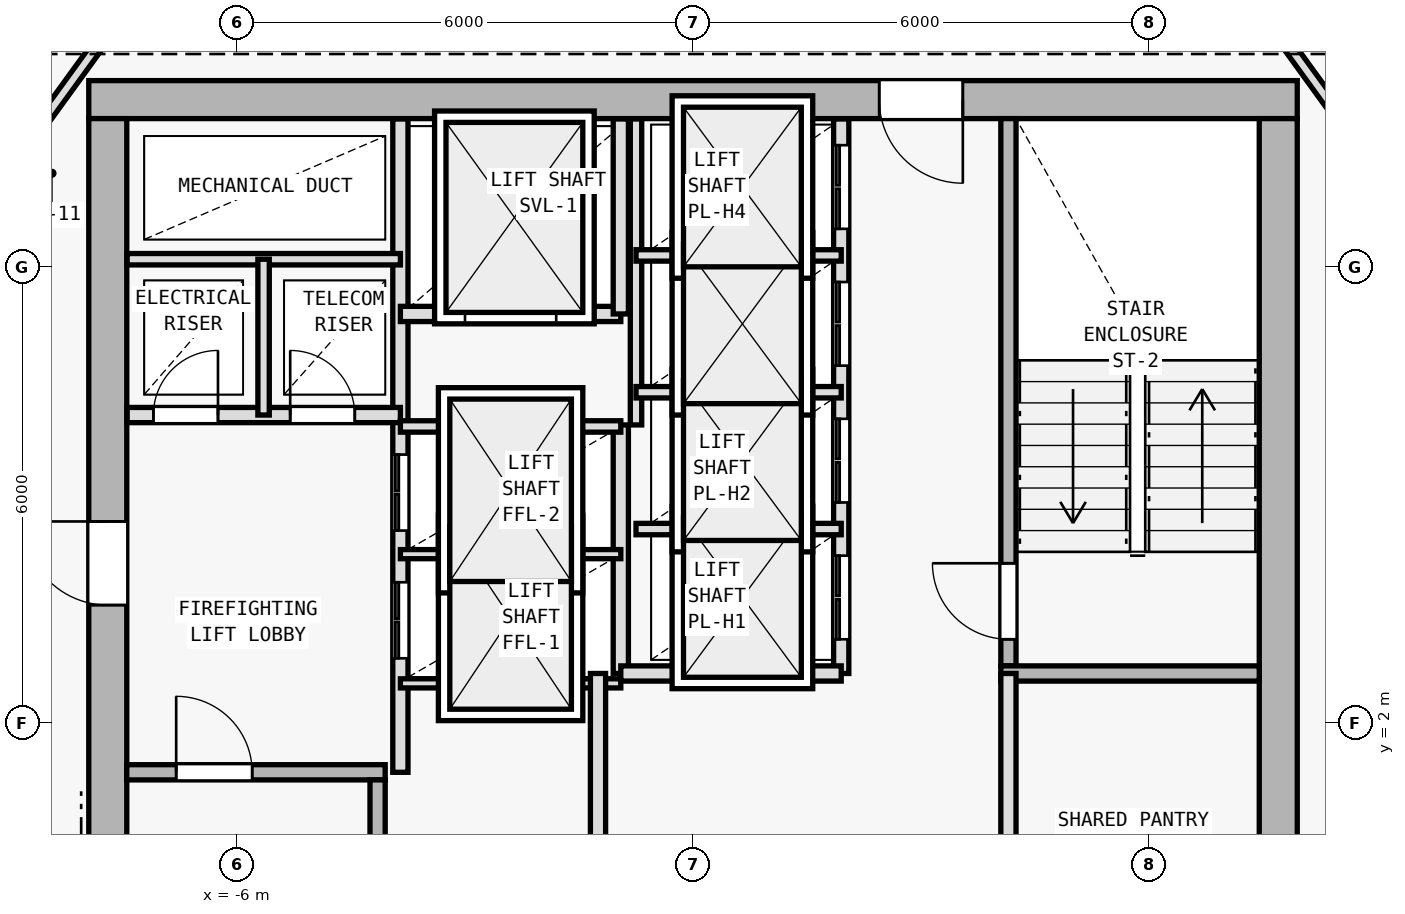
"""IFC4 building model, lengths in metres.
Left out: names, types, materials, properties, quantities, classifications, styles, units other than length and angle.
Written with IfcOpenShell. Run it as: python <this file> out.ifc"""

import sys

from ifc_helpers import new_model, si_unit, direction, frame, frame_2d, origin, origin_2d, place, context, subcontext, project, spatial, rectangle, i_section, extrude, element, fill, save


model = new_model("IFC4")
c1 = context("Model", 3, precision=1e-05, world=origin(), true_north=direction((0.0, 1.0)))
c2 = subcontext(c1, "Body", "Model", "MODEL_VIEW")
j1 = project(units=[si_unit("LENGTHUNIT", "METRE"), si_unit("PLANEANGLEUNIT", "RADIAN")], contexts=[c1])
p1 = place(None, origin())
s1 = spatial("IfcSite", under=j1, at=p1, CompositionType="ELEMENT")
p2 = place(p1, origin())
s2 = spatial("IfcBuilding", under=s1, at=p2, CompositionType="ELEMENT")
p3 = place(p2, frame((0.0, 0.0, 279.6)))
s3 = spatial("IfcBuildingStorey", under=s2, at=p3, CompositionType="ELEMENT", Elevation=279.6)
for number, where, z_axis, x_axis in (
    (1, (7.7, 10.2, 0.0), (0.0, 0.0, 1.0), (1.0, 0.0, 0.0)),
    (2, (-7.7, 10.2, 0.0), (0.0, 0.0, 1.0), (1.0, 0.0, 0.0)),
    (3, (7.7, 0.4, 0.0), (0.0, 0.0, 1.0), (1.0, 0.0, 0.0)),
    (4, (-7.7, 2.0, 0.0), (0.0, 0.0, 1.0), (1.0, 0.0, 0.0)),
):
    element("IfcColumn", number, at=place(p3, frame(where, z_axis=z_axis, x_axis=x_axis)), inside=s3, PredefinedType="COLUMN", context=c2, shape_type="SweptSolid", body=[
        extrude(i_section(OverallWidth=0.374, OverallDepth=0.372, WebThickness=0.012, FlangeThickness=0.02, FilletRadius=0.015, at=origin_2d()), origin(), (0.0, 0.0, 1.0), 3.6),
    ])
p4 = place(p3, frame((7.95, 10.2, 0.0), z_axis=(0.0, 0.0, 1.0), x_axis=(-1.0, 0.0, 0.0)))
e5 = element("IfcWall", 5, at=p4, inside=s3, PredefinedType="SHEAR", context=c2, shape_type="SweptSolid", body=[
    extrude(rectangle(XDim=15.9, YDim=0.5, at=frame_2d((7.95, 0.0))), origin(), (0.0, 0.0, 1.0), 3.35),
])
p5 = place(p4, frame((4.4, 0.0, 0.0)))
e6 = element("IfcOpeningElement", 6, at=p5, cuts=e5, PredefinedType="OPENING", context=c2, shape_type="SweptSolid", body=[
    extrude(rectangle(XDim=1.1, YDim=2.15, at=frame_2d((0.55, 1.075))), frame((0.0, 0.26, 0.0), z_axis=(0.0, -1.0, 0.0), x_axis=(1.0, 0.0, 0.0)), (0.0, 0.0, 1.0), 0.52),
])
p6 = place(p3, frame((-7.7, -9.15, 0.0), z_axis=(0.0, 0.0, 1.0), x_axis=(0.0, 1.0, 0.0)))
e7 = element("IfcWall", 7, at=p6, inside=s3, PredefinedType="SHEAR", context=c2, shape_type="SweptSolid", body=[
    extrude(rectangle(XDim=19.1, YDim=0.5, at=frame_2d((9.55, 0.0))), origin(), (0.0, 0.0, 1.0), 3.35),
])
p7 = place(p6, frame((12.7, 0.0, 0.0)))
e8 = element("IfcOpeningElement", 8, at=p7, cuts=e7, PredefinedType="OPENING", context=c2, shape_type="SweptSolid", body=[
    extrude(rectangle(XDim=1.1, YDim=2.15, at=frame_2d((0.55, 1.075))), frame((0.0, 0.26, 0.0), z_axis=(0.0, -1.0, 0.0), x_axis=(1.0, 0.0, 0.0)), (0.0, 0.0, 1.0), 0.52),
])
p8 = place(p3, frame((7.7, 9.95, 0.0), z_axis=(0.0, 0.0, 1.0), x_axis=(0.0, -1.0, 0.0)))
e9 = element("IfcWall", 9, at=p8, inside=s3, PredefinedType="SHEAR", context=c2, shape_type="SweptSolid", body=[
    extrude(rectangle(XDim=19.1, YDim=0.5, at=frame_2d((9.55, 0.0))), origin(), (0.0, 0.0, 1.0), 3.35),
])
p9 = place(p3, frame((-7.45, 1.35, 0.0), z_axis=(0.0, 0.0, 1.0), x_axis=(1.0, 0.0, 0.0)))
e10 = element("IfcWall", 10, at=p9, inside=s3, PredefinedType="SOLIDWALL", context=c2, shape_type="SweptSolid", body=[
    extrude(rectangle(XDim=3.4, YDim=0.2, at=frame_2d((1.7, 0.0))), origin(), (0.0, 0.0, 1.0), 3.35),
])
p10 = place(p9, frame((0.65, 0.0, 0.0)))
e11 = element("IfcOpeningElement", 11, at=p10, cuts=e10, PredefinedType="OPENING", context=c2, shape_type="SweptSolid", body=[
    extrude(rectangle(XDim=1.0, YDim=2.15, at=frame_2d((0.5, 1.075))), frame((0.0, 0.11, 0.0), z_axis=(0.0, -1.0, 0.0), x_axis=(1.0, 0.0, 0.0)), (0.0, 0.0, 1.0), 0.22),
])
p11 = place(p3, frame((-4.15, -5.95, 0.0), z_axis=(0.0, 0.0, 1.0), x_axis=(0.0, 1.0, 0.0)))
e12 = element("IfcWall", 12, at=p11, inside=s3, PredefinedType="SOLIDWALL", context=c2, shape_type="SweptSolid", body=[
    extrude(rectangle(XDim=7.2, YDim=0.2, at=frame_2d((3.6, 0.0))), origin(), (0.0, 0.0, 1.0), 3.35),
])
p12 = place(p3, frame((-3.85, 1.35, 0.0), z_axis=(0.0, 0.0, 1.0), x_axis=(0.0, 1.0, 0.0)))
e13 = element("IfcWall", 13, at=p12, inside=s3, PredefinedType="SOLIDWALL", context=c2, shape_type="SweptSolid", body=[
    extrude(rectangle(XDim=8.595, YDim=0.2, at=frame_2d((4.297, 0.0))), origin(), (0.0, 0.0, 1.0), 3.35),
])
p13 = place(p12, frame((1.5, 0.0, 0.0)))
e14 = element("IfcOpeningElement", 14, at=p13, cuts=e13, PredefinedType="OPENING", context=c2, shape_type="SweptSolid", body=[
    extrude(rectangle(XDim=1.0, YDim=2.15, at=frame_2d((0.5, 1.075))), frame((0.0, 0.11, 0.0), z_axis=(0.0, -1.0, 0.0), x_axis=(1.0, 0.0, 0.0)), (0.0, 0.0, 1.0), 0.22),
])
p14 = place(p12, frame((3.18, 0.0, 0.0)))
e15 = element("IfcOpeningElement", 15, at=p14, cuts=e13, PredefinedType="OPENING", context=c2, shape_type="SweptSolid", body=[
    extrude(rectangle(XDim=1.0, YDim=2.15, at=frame_2d((0.5, 1.075))), frame((0.0, 0.11, 0.0), z_axis=(0.0, -1.0, 0.0), x_axis=(1.0, 0.0, 0.0)), (0.0, 0.0, 1.0), 0.22),
])
p15 = place(p3, frame((-7.445, 6.05, 0.0), z_axis=(0.0, 0.0, 1.0), x_axis=(1.0, 0.0, 0.0)))
e16 = element("IfcWall", 16, at=p15, inside=s3, PredefinedType="SOLIDWALL", context=c2, shape_type="SweptSolid", body=[
    extrude(rectangle(XDim=3.595, YDim=0.2, at=frame_2d((1.797, 0.0))), origin(), (0.0, 0.0, 1.0), 3.35),
])
p16 = place(p15, frame((0.345, 0.0, 0.0)))
e17 = element("IfcOpeningElement", 17, at=p16, cuts=e16, PredefinedType="OPENING", context=c2, shape_type="SweptSolid", body=[
    extrude(rectangle(XDim=0.85, YDim=2.1, at=frame_2d((0.425, 1.05))), frame((0.0, 0.11, 0.0), z_axis=(0.0, -1.0, 0.0), x_axis=(1.0, 0.0, 0.0)), (0.0, 0.0, 1.0), 0.22),
])
p17 = place(p15, frame((2.145, 0.0, 0.0)))
e18 = element("IfcOpeningElement", 18, at=p17, cuts=e16, PredefinedType="OPENING", context=c2, shape_type="SweptSolid", body=[
    extrude(rectangle(XDim=0.85, YDim=2.1, at=frame_2d((0.425, 1.05))), frame((0.0, 0.11, 0.0), z_axis=(0.0, -1.0, 0.0), x_axis=(1.0, 0.0, 0.0)), (0.0, 0.0, 1.0), 0.22),
])
p18 = place(p3, frame((-7.445, 8.1, 0.0), z_axis=(0.0, 0.0, 1.0), x_axis=(1.0, 0.0, 0.0)))
e19 = element("IfcWall", 19, at=p18, inside=s3, PredefinedType="PARTITIONING", context=c2, shape_type="SweptSolid", body=[
    extrude(rectangle(XDim=3.595, YDim=0.15, at=frame_2d((1.797, 0.0))), origin(), (0.0, 0.0, 1.0), 3.35),
])
p19 = place(p3, frame((-5.65, 6.05, 0.0), z_axis=(0.0, 0.0, 1.0), x_axis=(0.0, 1.0, 0.0)))
e20 = element("IfcWall", 20, at=p19, inside=s3, PredefinedType="PARTITIONING", context=c2, shape_type="SweptSolid", body=[
    extrude(rectangle(XDim=2.05, YDim=0.15, at=frame_2d((1.025, 0.0))), origin(), (0.0, 0.0, 1.0), 3.35),
])
p20 = place(p3, frame((4.15, 2.75, 0.0), z_axis=(0.0, 0.0, 1.0), x_axis=(0.0, 1.0, 0.0)))
e21 = element("IfcWall", 21, at=p20, inside=s3, PredefinedType="SOLIDWALL", context=c2, shape_type="SweptSolid", body=[
    extrude(rectangle(XDim=7.2, YDim=0.2, at=frame_2d((3.6, 0.0))), origin(), (0.0, 0.0, 1.0), 3.35),
])
p21 = place(p20, frame((0.35, 0.0, 0.0)))
e22 = element("IfcOpeningElement", 22, at=p21, cuts=e21, PredefinedType="OPENING", context=c2, shape_type="SweptSolid", body=[
    extrude(rectangle(XDim=1.0, YDim=2.15, at=frame_2d((0.5, 1.075))), frame((0.0, 0.11, 0.0), z_axis=(0.0, -1.0, 0.0), x_axis=(1.0, 0.0, 0.0)), (0.0, 0.0, 1.0), 0.22),
])
p22 = place(p3, frame((4.05, 2.65, 0.0), z_axis=(0.0, 0.0, 1.0), x_axis=(1.0, 0.0, 0.0)))
e23 = element("IfcWall", 23, at=p22, inside=s3, PredefinedType="SOLIDWALL", context=c2, shape_type="SweptSolid", body=[
    extrude(rectangle(XDim=3.4, YDim=0.2, at=frame_2d((1.7, 0.0))), origin(), (0.0, 0.0, 1.0), 3.35),
])
p23 = place(p3, frame((-0.95, 2.65, 0.0), z_axis=(0.0, 0.0, 1.0), x_axis=(0.0, 1.0, 0.0)))
e24 = element("IfcWall", 24, at=p23, inside=s3, PredefinedType="SOLIDWALL", context=c2, shape_type="SweptSolid", body=[
    extrude(rectangle(XDim=3.27, YDim=0.2, at=frame_2d((1.635, 0.0))), origin(), (0.0, 0.0, 1.0), 3.35),
])
for number, where, z_axis, x_axis in (
    (25, (-3.85, 2.52, 0.0), (0.0, 0.0, 1.0), (1.0, 0.0, 0.0)),
    (26, (-3.85, 4.22, 0.0), (0.0, 0.0, 1.0), (1.0, 0.0, 0.0)),
):
    element("IfcWall", number, at=place(p3, frame(where, z_axis=z_axis, x_axis=x_axis)), inside=s3, PredefinedType="PARTITIONING", context=c2, shape_type="SweptSolid", body=[
        extrude(rectangle(XDim=2.9, YDim=0.12, at=frame_2d((1.45, 0.0))), origin(), (0.0, 0.0, 1.0), 3.35),
    ])
p24 = place(p3, frame((-3.85, 5.9, 0.0), z_axis=(0.0, 0.0, 1.0), x_axis=(1.0, 0.0, 0.0)))
e27 = element("IfcWall", 27, at=p24, inside=s3, PredefinedType="PARTITIONING", context=c2, shape_type="SweptSolid", body=[
    extrude(rectangle(XDim=2.9, YDim=0.15, at=frame_2d((1.45, 0.0))), origin(), (0.0, 0.0, 1.0), 3.35),
])
p25 = place(p3, frame((-3.85, 7.38, 0.0), z_axis=(0.0, 0.0, 1.0), x_axis=(1.0, 0.0, 0.0)))
e28 = element("IfcWall", 28, at=p25, inside=s3, PredefinedType="SOLIDWALL", context=c2, shape_type="SweptSolid", body=[
    extrude(rectangle(XDim=2.9, YDim=0.2, at=frame_2d((1.45, 0.0))), origin(), (0.0, 0.0, 1.0), 3.35),
])
p26 = place(p25, frame((0.85, 0.0, 0.0)))
e29 = element("IfcOpeningElement", 29, at=p26, cuts=e28, PredefinedType="OPENING", context=c2, shape_type="SweptSolid", body=[
    extrude(rectangle(XDim=1.2, YDim=2.2, at=frame_2d((0.6, 1.1))), frame((0.0, 0.11, 0.0), z_axis=(0.0, -1.0, 0.0), x_axis=(1.0, 0.0, 0.0)), (0.0, 0.0, 1.0), 0.22),
])
p27 = place(p3, frame((-0.95, 7.38, 0.0), z_axis=(0.0, 0.0, 1.0), x_axis=(0.0, 1.0, 0.0)))
e30 = element("IfcWall", 30, at=p27, inside=s3, PredefinedType="SOLIDWALL", context=c2, shape_type="SweptSolid", body=[
    extrude(rectangle(XDim=2.565, YDim=0.2, at=frame_2d((1.283, 0.0))), origin(), (0.0, 0.0, 1.0), 3.35),
])
p28 = place(p3, frame((4.15, -6.05, 0.0), z_axis=(0.0, 0.0, 1.0), x_axis=(0.0, 1.0, 0.0)))
e31 = element("IfcWall", 31, at=p28, inside=s3, PredefinedType="SOLIDWALL", context=c2, shape_type="SweptSolid", body=[
    extrude(rectangle(XDim=8.7, YDim=0.2, at=frame_2d((4.35, 0.0))), origin(), (0.0, 0.0, 1.0), 3.35),
])
p29 = place(p28, frame((3.6, 0.0, 0.0)))
e32 = element("IfcOpeningElement", 32, at=p29, cuts=e31, PredefinedType="OPENING", context=c2, shape_type="SweptSolid", body=[
    extrude(rectangle(XDim=0.95, YDim=2.1, at=frame_2d((0.475, 1.05))), frame((0.0, 0.11, 0.0), z_axis=(0.0, -1.0, 0.0), x_axis=(1.0, 0.0, 0.0)), (0.0, 0.0, 1.0), 0.22),
])
p30 = place(p3, frame((-1.25, -6.05, 0.0), z_axis=(0.0, 0.0, 1.0), x_axis=(0.0, 1.0, 0.0)))
e33 = element("IfcWall", 33, at=p30, inside=s3, PredefinedType="SOLIDWALL", context=c2, shape_type="SweptSolid", body=[
    extrude(rectangle(XDim=8.7, YDim=0.2, at=frame_2d((4.35, 0.0))), origin(), (0.0, 0.0, 1.0), 3.35),
])
p31 = place(p30, frame((3.4, 0.0, 0.0)))
e34 = element("IfcOpeningElement", 34, at=p31, cuts=e33, PredefinedType="OPENING", context=c2, shape_type="SweptSolid", body=[
    extrude(rectangle(XDim=0.95, YDim=2.1, at=frame_2d((0.475, 1.05))), frame((0.0, 0.11, 0.0), z_axis=(0.0, -1.0, 0.0), x_axis=(1.0, 0.0, 0.0)), (0.0, 0.0, 1.0), 0.22),
])
p32 = place(p3, frame((1.95, 2.65, 0.0), z_axis=(0.0, 0.0, 1.0), x_axis=(0.0, 1.0, 0.0)))
e35 = element("IfcWall", 35, at=p32, inside=s3, PredefinedType="SOLIDWALL", context=c2, shape_type="SweptSolid", body=[
    extrude(rectangle(XDim=7.295, YDim=0.2, at=frame_2d((3.647, 0.0))), origin(), (0.0, 0.0, 1.0), 3.35),
])
p33 = place(p32, frame((0.45, 0.0, 0.0)))
e36 = element("IfcOpeningElement", 36, at=p33, cuts=e35, PredefinedType="OPENING", context=c2, shape_type="SweptSolid", body=[
    extrude(rectangle(XDim=1.1, YDim=2.15, at=frame_2d((0.55, 1.075))), frame((0.0, 0.11, 0.0), z_axis=(0.0, -1.0, 0.0), x_axis=(1.0, 0.0, 0.0)), (0.0, 0.0, 1.0), 0.22),
])
p34 = place(p32, frame((2.25, 0.0, 0.0)))
e37 = element("IfcOpeningElement", 37, at=p34, cuts=e35, PredefinedType="OPENING", context=c2, shape_type="SweptSolid", body=[
    extrude(rectangle(XDim=1.1, YDim=2.15, at=frame_2d((0.55, 1.075))), frame((0.0, 0.11, 0.0), z_axis=(0.0, -1.0, 0.0), x_axis=(1.0, 0.0, 0.0)), (0.0, 0.0, 1.0), 0.22),
])
p35 = place(p32, frame((4.05, 0.0, 0.0)))
e38 = element("IfcOpeningElement", 38, at=p35, cuts=e35, PredefinedType="OPENING", context=c2, shape_type="SweptSolid", body=[
    extrude(rectangle(XDim=1.1, YDim=2.15, at=frame_2d((0.55, 1.075))), frame((0.0, 0.11, 0.0), z_axis=(0.0, -1.0, 0.0), x_axis=(1.0, 0.0, 0.0)), (0.0, 0.0, 1.0), 0.22),
])
p36 = place(p32, frame((5.85, 0.0, 0.0)))
e39 = element("IfcOpeningElement", 39, at=p36, cuts=e35, PredefinedType="OPENING", context=c2, shape_type="SweptSolid", body=[
    extrude(rectangle(XDim=1.1, YDim=2.15, at=frame_2d((0.55, 1.075))), frame((0.0, 0.11, 0.0), z_axis=(0.0, -1.0, 0.0), x_axis=(1.0, 0.0, 0.0)), (0.0, 0.0, 1.0), 0.22),
])
p37 = place(p3, frame((-0.95, 2.65, 0.0), z_axis=(0.0, 0.0, 1.0), x_axis=(1.0, 0.0, 0.0)))
e40 = element("IfcWall", 40, at=p37, inside=s3, PredefinedType="SOLIDWALL", context=c2, shape_type="SweptSolid", body=[
    extrude(rectangle(XDim=2.9, YDim=0.2, at=frame_2d((1.45, 0.0))), origin(), (0.0, 0.0, 1.0), 3.35),
])
p38 = place(p3, frame((-0.75, 5.92, 0.0), z_axis=(0.0, 0.0, 1.0), x_axis=(0.0, 1.0, 0.0)))
e41 = element("IfcWall", 41, at=p38, inside=s3, PredefinedType="PARTITIONING", context=c2, shape_type="SweptSolid", body=[
    extrude(rectangle(XDim=4.025, YDim=0.15, at=frame_2d((2.013, 0.0))), origin(), (0.0, 0.0, 1.0), 3.35),
])
for number, where, z_axis, x_axis in (
    (42, (-0.75, 4.55, 0.0), (0.0, 0.0, 1.0), (1.0, 0.0, 0.0)),
    (43, (-0.75, 6.35, 0.0), (0.0, 0.0, 1.0), (1.0, 0.0, 0.0)),
    (44, (-0.75, 8.15, 0.0), (0.0, 0.0, 1.0), (1.0, 0.0, 0.0)),
):
    element("IfcWall", number, at=place(p3, frame(where, z_axis=z_axis, x_axis=x_axis)), inside=s3, PredefinedType="PARTITIONING", context=c2, shape_type="SweptSolid", body=[
        extrude(rectangle(XDim=2.7, YDim=0.15, at=frame_2d((1.35, 0.0))), origin(), (0.0, 0.0, 1.0), 3.35),
    ])
p39 = place(p3, frame((-9.78, 8.226, 0.0), z_axis=(0.0, 0.0, 1.0), x_axis=(0.586956386413, 0.809618552436, 0.0)))
e45 = element("IfcWall", 45, at=p39, inside=s3, PredefinedType="PARTITIONING", context=c2, shape_type="SweptSolid", body=[
    extrude(rectangle(XDim=5.008, YDim=0.15, at=frame_2d((2.504, 0.0))), origin(), (0.0, 0.0, 1.0), 3.015),
])
p40 = place(p39, frame((1.154, 0.0, 0.0)))
e46 = element("IfcOpeningElement", 46, at=p40, cuts=e45, PredefinedType="OPENING", context=c2, shape_type="SweptSolid", body=[
    extrude(rectangle(XDim=0.9, YDim=2.1, at=frame_2d((0.45, 1.05))), frame((0.0, 0.085, 0.0), z_axis=(0.0, -1.0, 0.0), x_axis=(1.0, 0.0, 0.0)), (0.0, 0.0, 1.0), 0.17),
])
p41 = place(p3, frame((6.841, 12.28, 0.0), z_axis=(0.0, 0.0, 1.0), x_axis=(0.586956386413, -0.809618552436, 0.0)))
e47 = element("IfcWall", 47, at=p41, inside=s3, PredefinedType="PARTITIONING", context=c2, shape_type="SweptSolid", body=[
    extrude(rectangle(XDim=5.008, YDim=0.15, at=frame_2d((2.504, 0.0))), origin(), (0.0, 0.0, 1.0), 2.725),
])
p42 = place(p7, origin())
e48 = element("IfcDoor", 48, at=p42, inside=s3, OperationType="SINGLE_SWING_RIGHT", PredefinedType="DOOR", context=c2, shape_type="SweptSolid", body=[
    extrude(rectangle(XDim=1.1, YDim=2.15, at=frame_2d((0.55, 1.075))), frame((0.0, 0.025, 0.0), z_axis=(0.0, -1.0, 0.0), x_axis=(1.0, 0.0, 0.0)), (0.0, 0.0, 1.0), 0.05),
])
fill(e8, e48)
p43 = place(p5, origin())
e49 = element("IfcDoor", 49, at=p43, inside=s3, OperationType="SINGLE_SWING_LEFT", PredefinedType="DOOR", context=c2, shape_type="SweptSolid", body=[
    extrude(rectangle(XDim=1.1, YDim=2.15, at=frame_2d((0.55, 1.075))), frame((0.0, 0.025, 0.0), z_axis=(0.0, -1.0, 0.0), x_axis=(1.0, 0.0, 0.0)), (0.0, 0.0, 1.0), 0.05),
])
fill(e6, e49)
p44 = place(p10, origin())
e50 = element("IfcDoor", 50, at=p44, inside=s3, OperationType="SINGLE_SWING_LEFT", PredefinedType="DOOR", context=c2, shape_type="SweptSolid", body=[
    extrude(rectangle(XDim=1.0, YDim=2.15, at=frame_2d((0.5, 1.075))), frame((0.0, 0.025, 0.0), z_axis=(0.0, -1.0, 0.0), x_axis=(1.0, 0.0, 0.0)), (0.0, 0.0, 1.0), 0.05),
])
fill(e11, e50)
p45 = place(p16, origin())
e51 = element("IfcDoor", 51, at=p45, inside=s3, OperationType="SINGLE_SWING_RIGHT", PredefinedType="DOOR", context=c2, shape_type="SweptSolid", body=[
    extrude(rectangle(XDim=0.85, YDim=2.1, at=frame_2d((0.425, 1.05))), frame((0.0, 0.025, 0.0), z_axis=(0.0, -1.0, 0.0), x_axis=(1.0, 0.0, 0.0)), (0.0, 0.0, 1.0), 0.05),
])
fill(e17, e51)
p46 = place(p17, origin())
e52 = element("IfcDoor", 52, at=p46, inside=s3, OperationType="SINGLE_SWING_LEFT", PredefinedType="DOOR", context=c2, shape_type="SweptSolid", body=[
    extrude(rectangle(XDim=0.85, YDim=2.1, at=frame_2d((0.425, 1.05))), frame((0.0, 0.025, 0.0), z_axis=(0.0, -1.0, 0.0), x_axis=(1.0, 0.0, 0.0)), (0.0, 0.0, 1.0), 0.05),
])
fill(e18, e52)
p47 = place(p21, origin())
e53 = element("IfcDoor", 53, at=p47, inside=s3, OperationType="SINGLE_SWING_RIGHT", PredefinedType="DOOR", context=c2, shape_type="SweptSolid", body=[
    extrude(rectangle(XDim=1.0, YDim=2.15, at=frame_2d((0.5, 1.075))), frame((0.0, 0.025, 0.0), z_axis=(0.0, -1.0, 0.0), x_axis=(1.0, 0.0, 0.0)), (0.0, 0.0, 1.0), 0.05),
])
fill(e22, e53)
p48 = place(p26, origin())
e54 = element("IfcDoor", 54, at=p48, inside=s3, OperationType="DOUBLE_DOOR_SLIDING", PredefinedType="DOOR", context=c2, shape_type="SweptSolid", body=[
    extrude(rectangle(XDim=1.2, YDim=2.2, at=frame_2d((0.6, 1.1))), frame((0.0, 0.025, 0.0), z_axis=(0.0, -1.0, 0.0), x_axis=(1.0, 0.0, 0.0)), (0.0, 0.0, 1.0), 0.05),
])
fill(e29, e54)
p49 = place(p33, origin())
e55 = element("IfcDoor", 55, at=p49, inside=s3, OperationType="DOUBLE_DOOR_SLIDING", PredefinedType="DOOR", context=c2, shape_type="SweptSolid", body=[
    extrude(rectangle(XDim=1.1, YDim=2.15, at=frame_2d((0.55, 1.075))), frame((0.0, 0.025, 0.0), z_axis=(0.0, -1.0, 0.0), x_axis=(1.0, 0.0, 0.0)), (0.0, 0.0, 1.0), 0.05),
])
fill(e36, e55)
p50 = place(p34, origin())
e56 = element("IfcDoor", 56, at=p50, inside=s3, OperationType="DOUBLE_DOOR_SLIDING", PredefinedType="DOOR", context=c2, shape_type="SweptSolid", body=[
    extrude(rectangle(XDim=1.1, YDim=2.15, at=frame_2d((0.55, 1.075))), frame((0.0, 0.025, 0.0), z_axis=(0.0, -1.0, 0.0), x_axis=(1.0, 0.0, 0.0)), (0.0, 0.0, 1.0), 0.05),
])
fill(e37, e56)
p51 = place(p35, origin())
e57 = element("IfcDoor", 57, at=p51, inside=s3, OperationType="DOUBLE_DOOR_SLIDING", PredefinedType="DOOR", context=c2, shape_type="SweptSolid", body=[
    extrude(rectangle(XDim=1.1, YDim=2.15, at=frame_2d((0.55, 1.075))), frame((0.0, 0.025, 0.0), z_axis=(0.0, -1.0, 0.0), x_axis=(1.0, 0.0, 0.0)), (0.0, 0.0, 1.0), 0.05),
])
fill(e38, e57)
p52 = place(p36, origin())
e58 = element("IfcDoor", 58, at=p52, inside=s3, OperationType="DOUBLE_DOOR_SLIDING", PredefinedType="DOOR", context=c2, shape_type="SweptSolid", body=[
    extrude(rectangle(XDim=1.1, YDim=2.15, at=frame_2d((0.55, 1.075))), frame((0.0, 0.025, 0.0), z_axis=(0.0, -1.0, 0.0), x_axis=(1.0, 0.0, 0.0)), (0.0, 0.0, 1.0), 0.05),
])
fill(e39, e58)
p53 = place(p13, origin())
e59 = element("IfcDoor", 59, at=p53, inside=s3, OperationType="DOUBLE_DOOR_SLIDING", PredefinedType="DOOR", context=c2, shape_type="SweptSolid", body=[
    extrude(rectangle(XDim=1.0, YDim=2.15, at=frame_2d((0.5, 1.075))), frame((0.0, 0.025, 0.0), z_axis=(0.0, -1.0, 0.0), x_axis=(1.0, 0.0, 0.0)), (0.0, 0.0, 1.0), 0.05),
])
fill(e14, e59)
p54 = place(p14, origin())
e60 = element("IfcDoor", 60, at=p54, inside=s3, OperationType="DOUBLE_DOOR_SLIDING", PredefinedType="DOOR", context=c2, shape_type="SweptSolid", body=[
    extrude(rectangle(XDim=1.0, YDim=2.15, at=frame_2d((0.5, 1.075))), frame((0.0, 0.025, 0.0), z_axis=(0.0, -1.0, 0.0), x_axis=(1.0, 0.0, 0.0)), (0.0, 0.0, 1.0), 0.05),
])
fill(e15, e60)
save(model, sys.argv[1])
